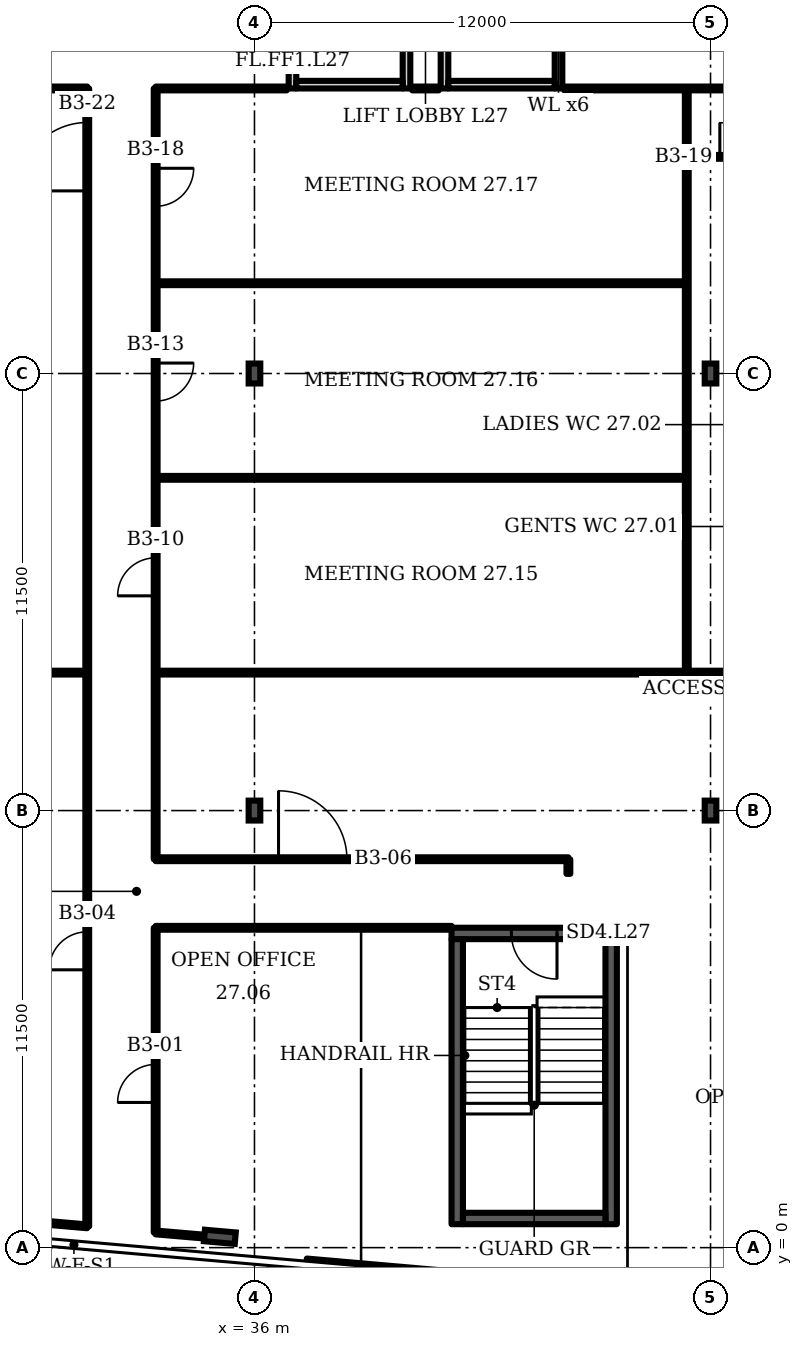
"""IFC4 building model, lengths in metres.
Left out: names, types, materials, properties, quantities, classifications, styles, units other than length and angle.
Written with IfcOpenShell. Run it as: python <this file> out.ifc"""

import sys

from ifc_helpers import new_model, si_unit, direction, frame, frame_2d, origin, origin_2d, place, context, subcontext, project, spatial, rectangle, i_section, extrude, element, fill, save


model = new_model("IFC4")
c1 = context("Model", 3, precision=1e-05, world=origin(), true_north=direction((0.0, 1.0)))
c2 = subcontext(c1, "Body", "Model", "MODEL_VIEW")
j1 = project(units=[si_unit("LENGTHUNIT", "METRE"), si_unit("PLANEANGLEUNIT", "RADIAN")], contexts=[c1])
p1 = place(None, origin())
s1 = spatial("IfcSite", under=j1, at=p1, CompositionType="ELEMENT")
p2 = place(p1, origin())
s2 = spatial("IfcBuilding", under=s1, at=p2, CompositionType="ELEMENT")
p3 = place(p2, frame((0.0, 0.0, 118.3)))
s3 = spatial("IfcBuildingStorey", under=s2, at=p3, CompositionType="ELEMENT", Elevation=118.3)
p4 = place(p3, frame((35.089, 0.285, 0.0), z_axis=(0.0, 0.0, 1.0), x_axis=(-0.087156, -0.996198, 0.0)))
e1 = element("IfcColumn", 1, at=p4, inside=s3, PredefinedType="COLUMN", context=c2, shape_type="SweptSolid", body=[
    extrude(i_section(OverallWidth=0.303, OverallDepth=0.814, WebThickness=0.021, FlangeThickness=0.04, FilletRadius=0.03, at=origin_2d()), origin(), (0.0, 0.0, 1.0), 3.6),
])
for number, where, z_axis, x_axis in (
    (2, (36.0, 11.5, 0.0), (0.0, 0.0, 1.0), (1.0, 0.0, 0.0)),
    (3, (48.0, 11.5, 0.0), (0.0, 0.0, 1.0), (1.0, 0.0, 0.0)),
    (4, (36.0, 23.0, 0.0), (0.0, 0.0, 1.0), (1.0, 0.0, 0.0)),
    (5, (48.0, 23.0, 0.0), (0.0, 0.0, 1.0), (1.0, 0.0, 0.0)),
):
    element("IfcColumn", number, at=place(p3, frame(where, z_axis=z_axis, x_axis=x_axis)), inside=s3, PredefinedType="COLUMN", context=c2, shape_type="SweptSolid", body=[
        extrude(i_section(OverallWidth=0.306, OverallDepth=0.524, WebThickness=0.021, FlangeThickness=0.04, FilletRadius=0.027, at=origin_2d()), origin(), (0.0, 0.0, 1.0), 3.6),
    ])
p5 = place(p3, frame((37.363, -0.461, 0.0), z_axis=(0.0, 0.0, 1.0), x_axis=(0.996194, -0.087159, 0.0)))
e6 = element("IfcWall", 6, at=p5, inside=s3, PredefinedType="SOLIDWALL", context=c2, shape_type="SweptSolid", body=[
    extrude(rectangle(XDim=12.199, YDim=0.35, at=frame_2d((6.099, 0.0))), origin(), (0.0, 0.0, 1.0), 1.0),
])
p6 = place(p3, frame((37.0, 30.5, 0.0), z_axis=(0.0, 0.0, 1.0), x_axis=(0.0, 1.0, 0.0)))
e7 = element("IfcWall", 7, at=p6, inside=s3, PredefinedType="PARTITIONING", context=c2, shape_type="SweptSolid", body=[
    extrude(rectangle(XDim=3.5, YDim=0.2, at=frame_2d((1.75, 0.0))), origin(), (0.0, 0.0, 1.0), 3.2),
])
p7 = place(p6, frame((1.2, 0.0, 0.0)))
e8 = element("IfcOpeningElement", 8, at=p7, cuts=e7, PredefinedType="OPENING", context=c2, shape_type="SweptSolid", body=[
    extrude(rectangle(XDim=1.1, YDim=2.1, at=frame_2d((0.55, 1.05))), frame((0.0, 0.11, 0.0), z_axis=(0.0, -1.0, 0.0), x_axis=(1.0, 0.0, 0.0)), (0.0, 0.0, 1.0), 0.22),
])
p8 = place(p3, frame((40.0, 30.5, 0.0), z_axis=(0.0, 0.0, 1.0), x_axis=(0.0, 1.0, 0.0)))
e9 = element("IfcWall", 9, at=p8, inside=s3, PredefinedType="PARTITIONING", context=c2, shape_type="SweptSolid", body=[
    extrude(rectangle(XDim=3.5, YDim=0.2, at=frame_2d((1.75, 0.0))), origin(), (0.0, 0.0, 1.0), 3.2),
])
p9 = place(p3, frame((37.1, 30.6, 0.0), z_axis=(0.0, 0.0, 1.0), x_axis=(1.0, 0.0, 0.0)))
e10 = element("IfcWall", 10, at=p9, inside=s3, PredefinedType="PARTITIONING", context=c2, shape_type="SweptSolid", body=[
    extrude(rectangle(XDim=2.8, YDim=0.2, at=frame_2d((1.4, 0.0))), origin(), (0.0, 0.0, 1.0), 3.2),
])
p10 = place(p3, frame((41.0, 30.5, 0.0), z_axis=(0.0, 0.0, 1.0), x_axis=(0.0, 1.0, 0.0)))
e11 = element("IfcWall", 11, at=p10, inside=s3, PredefinedType="PARTITIONING", context=c2, shape_type="SweptSolid", body=[
    extrude(rectangle(XDim=3.5, YDim=0.2, at=frame_2d((1.75, 0.0))), origin(), (0.0, 0.0, 1.0), 3.2),
])
p11 = place(p3, frame((44.0, 30.5, 0.0), z_axis=(0.0, 0.0, 1.0), x_axis=(0.0, 1.0, 0.0)))
e12 = element("IfcWall", 12, at=p11, inside=s3, PredefinedType="PARTITIONING", context=c2, shape_type="SweptSolid", body=[
    extrude(rectangle(XDim=3.5, YDim=0.2, at=frame_2d((1.75, 0.0))), origin(), (0.0, 0.0, 1.0), 3.2),
])
p12 = place(p11, frame((1.2, 0.0, 0.0)))
e13 = element("IfcOpeningElement", 13, at=p12, cuts=e12, PredefinedType="OPENING", context=c2, shape_type="SweptSolid", body=[
    extrude(rectangle(XDim=1.1, YDim=2.1, at=frame_2d((0.55, 1.05))), frame((0.0, 0.11, 0.0), z_axis=(0.0, -1.0, 0.0), x_axis=(1.0, 0.0, 0.0)), (0.0, 0.0, 1.0), 0.22),
])
p13 = place(p3, frame((41.1, 30.6, 0.0), z_axis=(0.0, 0.0, 1.0), x_axis=(1.0, 0.0, 0.0)))
e14 = element("IfcWall", 14, at=p13, inside=s3, PredefinedType="PARTITIONING", context=c2, shape_type="SweptSolid", body=[
    extrude(rectangle(XDim=2.8, YDim=0.2, at=frame_2d((1.4, 0.0))), origin(), (0.0, 0.0, 1.0), 3.2),
])
p14 = place(p3, frame((41.185, 8.267, 0.0), z_axis=(0.0, 0.0, 1.0), x_axis=(1.0, 0.0, 0.0)))
e15 = element("IfcWall", 15, at=p14, inside=s3, PredefinedType="SHEAR", context=c2, shape_type="SweptSolid", body=[
    extrude(rectangle(XDim=4.35, YDim=0.3, at=frame_2d((2.175, 0.0))), origin(), (0.0, 0.0, 1.0), 3.2),
])
p15 = place(p14, frame((1.575, 0.0, 0.0)))
e16 = element("IfcOpeningElement", 16, at=p15, cuts=e15, PredefinedType="OPENING", context=c2, shape_type="SweptSolid", body=[
    extrude(rectangle(XDim=1.2, YDim=2.1, at=frame_2d((0.6, 1.05))), frame((0.0, 0.16, 0.0), z_axis=(0.0, -1.0, 0.0), x_axis=(1.0, 0.0, 0.0)), (0.0, 0.0, 1.0), 0.32),
])
p16 = place(p3, frame((13.0, 15.13, 0.0), z_axis=(0.0, 0.0, 1.0), x_axis=(1.0, 0.0, 0.0)))
e17 = element("IfcWall", 17, at=p16, inside=s3, PredefinedType="PARTITIONING", context=c2, shape_type="SweptSolid", body=[
    extrude(rectangle(XDim=18.6, YDim=0.1, at=frame_2d((9.3, 0.0))), origin(), (0.0, 0.0, 1.0), 3.2),
])
p17 = place(p3, frame((17.8, 30.5, 0.0), z_axis=(0.0, 0.0, 1.0), x_axis=(1.0, 0.0, 0.0)))
e18 = element("IfcWall", 18, at=p17, inside=s3, PredefinedType="PARTITIONING", context=c2, shape_type="SweptSolid", body=[
    extrude(rectangle(XDim=13.8, YDim=0.1, at=frame_2d((6.9, 0.0))), origin(), (0.0, 0.0, 1.0), 3.2),
])
p18 = place(p3, frame((31.6, 0.56, 0.0), z_axis=(0.0, 0.0, 1.0), x_axis=(0.0, 1.0, 0.0)))
e19 = element("IfcWall", 19, at=p18, inside=s3, PredefinedType="PARTITIONING", context=c2, shape_type="SweptSolid", body=[
    extrude(rectangle(XDim=29.94, YDim=0.1, at=frame_2d((14.97, 0.0))), origin(), (0.0, 0.0, 1.0), 3.2),
])
p19 = place(p18, frame((6.75, 0.0, 0.0)))
e20 = element("IfcOpeningElement", 20, at=p19, cuts=e19, PredefinedType="OPENING", context=c2, shape_type="SweptSolid", body=[
    extrude(rectangle(XDim=1.0, YDim=2.1, at=frame_2d((0.5, 1.05))), frame((0.0, 0.06, 0.0), z_axis=(0.0, -1.0, 0.0), x_axis=(1.0, 0.0, 0.0)), (0.0, 0.0, 1.0), 0.12),
])
p20 = place(p18, frame((27.245, 0.0, 0.0)))
e21 = element("IfcOpeningElement", 21, at=p20, cuts=e19, PredefinedType="OPENING", context=c2, shape_type="SweptSolid", body=[
    extrude(rectangle(XDim=1.8, YDim=2.1, at=frame_2d((0.9, 1.05))), frame((0.0, 0.06, 0.0), z_axis=(0.0, -1.0, 0.0), x_axis=(1.0, 0.0, 0.0)), (0.0, 0.0, 1.0), 0.12),
])
p21 = place(p3, frame((31.6, 0.56, 0.0), z_axis=(0.0, 0.0, 1.0), x_axis=(-0.996229, 0.086796, 0.0)))
e22 = element("IfcWall", 22, at=p21, inside=s3, PredefinedType="PARTITIONING", context=c2, shape_type="SweptSolid", body=[
    extrude(rectangle(XDim=6.911, YDim=0.1, at=frame_2d((3.456, 0.0))), origin(), (0.0, 0.0, 1.0), 2.58),
])
p22 = place(p3, frame((33.4, 0.4, 0.0), z_axis=(0.0, 0.0, 1.0), x_axis=(0.0, 1.0, 0.0)))
e23 = element("IfcWall", 23, at=p22, inside=s3, PredefinedType="PARTITIONING", context=c2, shape_type="SweptSolid", body=[
    extrude(rectangle(XDim=8.015, YDim=0.1, at=frame_2d((4.008, 0.0))), origin(), (0.0, 0.0, 1.0), 3.2),
])
p23 = place(p22, frame((3.42, 0.0, 0.0)))
e24 = element("IfcOpeningElement", 24, at=p23, cuts=e23, PredefinedType="OPENING", context=c2, shape_type="SweptSolid", body=[
    extrude(rectangle(XDim=1.0, YDim=2.1, at=frame_2d((0.5, 1.05))), frame((0.0, 0.06, 0.0), z_axis=(0.0, -1.0, 0.0), x_axis=(1.0, 0.0, 0.0)), (0.0, 0.0, 1.0), 0.12),
])
p24 = place(p3, frame((33.4, 8.415, 0.0), z_axis=(0.0, 0.0, 1.0), x_axis=(1.0, 0.0, 0.0)))
e25 = element("IfcWall", 25, at=p24, inside=s3, PredefinedType="PARTITIONING", context=c2, shape_type="SweptSolid", body=[
    extrude(rectangle(XDim=7.785, YDim=0.1, at=frame_2d((3.893, 0.0))), origin(), (0.0, 0.0, 1.0), 3.2),
])
p25 = place(p3, frame((33.4, 10.22, 0.0), z_axis=(0.0, 0.0, 1.0), x_axis=(0.0, 1.0, 0.0)))
e26 = element("IfcWall", 26, at=p25, inside=s3, PredefinedType="PARTITIONING", context=c2, shape_type="SweptSolid", body=[
    extrude(rectangle(XDim=20.28, YDim=0.1, at=frame_2d((10.14, 0.0))), origin(), (0.0, 0.0, 1.0), 3.2),
])
p26 = place(p25, frame((6.93, 0.0, 0.0)))
e27 = element("IfcOpeningElement", 27, at=p26, cuts=e26, PredefinedType="OPENING", context=c2, shape_type="SweptSolid", body=[
    extrude(rectangle(XDim=1.0, YDim=2.1, at=frame_2d((0.5, 1.05))), frame((0.0, 0.06, 0.0), z_axis=(0.0, -1.0, 0.0), x_axis=(1.0, 0.0, 0.0)), (0.0, 0.0, 1.0), 0.12),
])
p27 = place(p25, frame((12.055, 0.0, 0.0)))
e28 = element("IfcOpeningElement", 28, at=p27, cuts=e26, PredefinedType="OPENING", context=c2, shape_type="SweptSolid", body=[
    extrude(rectangle(XDim=1.0, YDim=2.1, at=frame_2d((0.5, 1.05))), frame((0.0, 0.06, 0.0), z_axis=(0.0, -1.0, 0.0), x_axis=(1.0, 0.0, 0.0)), (0.0, 0.0, 1.0), 0.12),
])
p28 = place(p25, frame((17.18, 0.0, 0.0)))
e29 = element("IfcOpeningElement", 29, at=p28, cuts=e26, PredefinedType="OPENING", context=c2, shape_type="SweptSolid", body=[
    extrude(rectangle(XDim=1.0, YDim=2.1, at=frame_2d((0.5, 1.05))), frame((0.0, 0.06, 0.0), z_axis=(0.0, -1.0, 0.0), x_axis=(1.0, 0.0, 0.0)), (0.0, 0.0, 1.0), 0.12),
])
p29 = place(p3, frame((33.4, 10.22, 0.0), z_axis=(0.0, 0.0, 1.0), x_axis=(1.0, 0.0, 0.0)))
e30 = element("IfcWall", 30, at=p29, inside=s3, PredefinedType="PARTITIONING", context=c2, shape_type="SweptSolid", body=[
    extrude(rectangle(XDim=10.86, YDim=0.1, at=frame_2d((5.43, 0.0))), origin(), (0.0, 0.0, 1.0), 3.2),
])
p30 = place(p29, frame((3.233, 0.0, 0.0)))
e31 = element("IfcOpeningElement", 31, at=p30, cuts=e30, PredefinedType="OPENING", context=c2, shape_type="SweptSolid", body=[
    extrude(rectangle(XDim=1.8, YDim=2.1, at=frame_2d((0.9, 1.05))), frame((0.0, 0.06, 0.0), z_axis=(0.0, -1.0, 0.0), x_axis=(1.0, 0.0, 0.0)), (0.0, 0.0, 1.0), 0.12),
])
p31 = place(p3, frame((33.4, 15.13, 0.0), z_axis=(0.0, 0.0, 1.0), x_axis=(1.0, 0.0, 0.0)))
e32 = element("IfcWall", 32, at=p31, inside=s3, PredefinedType="PARTITIONING", context=c2, shape_type="SweptSolid", body=[
    extrude(rectangle(XDim=24.2, YDim=0.1, at=frame_2d((12.1, 0.0))), origin(), (0.0, 0.0, 1.0), 3.2),
])
for number, where, z_axis, x_axis in (
    (33, (33.4, 20.255, 0.0), (0.0, 0.0, 1.0), (1.0, 0.0, 0.0)),
    (34, (33.4, 25.375, 0.0), (0.0, 0.0, 1.0), (1.0, 0.0, 0.0)),
):
    element("IfcWall", number, at=place(p3, frame(where, z_axis=z_axis, x_axis=x_axis)), inside=s3, PredefinedType="PARTITIONING", context=c2, shape_type="SweptSolid", body=[
        extrude(rectangle(XDim=13.975, YDim=0.1, at=frame_2d((6.988, 0.0))), origin(), (0.0, 0.0, 1.0), 3.2),
    ])
p32 = place(p3, frame((33.4, 30.5, 0.0), z_axis=(0.0, 0.0, 1.0), x_axis=(1.0, 0.0, 0.0)))
e35 = element("IfcWall", 35, at=p32, inside=s3, PredefinedType="PARTITIONING", context=c2, shape_type="SweptSolid", body=[
    extrude(rectangle(XDim=3.45, YDim=0.1, at=frame_2d((1.725, 0.0))), origin(), (0.0, 0.0, 1.0), 3.2),
])
p33 = place(p3, frame((35.085, 0.255, 0.0), z_axis=(0.0, 0.0, 1.0), x_axis=(-0.996316, 0.085745, 0.0)))
e36 = element("IfcWall", 36, at=p33, inside=s3, PredefinedType="PARTITIONING", context=c2, shape_type="SweptSolid", body=[
    extrude(rectangle(XDim=1.691, YDim=0.1, at=frame_2d((0.846, 0.0))), origin(), (0.0, 0.0, 1.0), 2.58),
])
p34 = place(p3, frame((44.26, 9.835, 0.0), z_axis=(0.0, 0.0, 1.0), x_axis=(0.0, 1.0, 0.0)))
e37 = element("IfcWall", 37, at=p34, inside=s3, PredefinedType="PARTITIONING", context=c2, shape_type="SweptSolid", body=[
    extrude(rectangle(XDim=0.38, YDim=0.1, at=frame_2d((0.19, 0.0))), origin(), (0.0, 0.0, 1.0), 3.2),
])
p35 = place(p3, frame((47.375, 15.13, 0.0), z_axis=(0.0, 0.0, 1.0), x_axis=(0.0, 1.0, 0.0)))
e38 = element("IfcWall", 38, at=p35, inside=s3, PredefinedType="PARTITIONING", context=c2, shape_type="SweptSolid", body=[
    extrude(rectangle(XDim=15.36, YDim=0.1, at=frame_2d((7.68, 0.0))), origin(), (0.0, 0.0, 1.0), 3.2),
])
p36 = place(p3, frame((47.375, 28.7, 0.0), z_axis=(0.0, 0.0, 1.0), x_axis=(1.0, 0.0, 0.0)))
e39 = element("IfcWall", 39, at=p36, inside=s3, PredefinedType="PARTITIONING", context=c2, shape_type="SweptSolid", body=[
    extrude(rectangle(XDim=6.875, YDim=0.1, at=frame_2d((3.438, 0.0))), origin(), (0.0, 0.0, 1.0), 3.2),
])
p37 = place(p36, frame((0.87, 0.0, 0.0)))
e40 = element("IfcOpeningElement", 40, at=p37, cuts=e39, PredefinedType="OPENING", context=c2, shape_type="SweptSolid", body=[
    extrude(rectangle(XDim=0.9, YDim=2.1, at=frame_2d((0.45, 1.05))), frame((0.0, 0.06, 0.0), z_axis=(0.0, -1.0, 0.0), x_axis=(1.0, 0.0, 0.0)), (0.0, 0.0, 1.0), 0.12),
])
p38 = place(p36, frame((3.26, 0.0, 0.0)))
e41 = element("IfcOpeningElement", 41, at=p38, cuts=e39, PredefinedType="OPENING", context=c2, shape_type="SweptSolid", body=[
    extrude(rectangle(XDim=0.9, YDim=2.1, at=frame_2d((0.45, 1.05))), frame((0.0, 0.06, 0.0), z_axis=(0.0, -1.0, 0.0), x_axis=(1.0, 0.0, 0.0)), (0.0, 0.0, 1.0), 0.12),
])
p39 = place(p36, frame((5.395, 0.0, 0.0)))
e42 = element("IfcOpeningElement", 42, at=p39, cuts=e39, PredefinedType="OPENING", context=c2, shape_type="SweptSolid", body=[
    extrude(rectangle(XDim=1.0, YDim=2.1, at=frame_2d((0.5, 1.05))), frame((0.0, 0.06, 0.0), z_axis=(0.0, -1.0, 0.0), x_axis=(1.0, 0.0, 0.0)), (0.0, 0.0, 1.0), 0.12),
])
p40 = place(p3, frame((40.15, 30.5, 0.0), z_axis=(0.0, 0.0, 1.0), x_axis=(1.0, 0.0, 0.0)))
e43 = element("IfcWall", 43, at=p40, inside=s3, PredefinedType="PARTITIONING", context=c2, shape_type="SweptSolid", body=[
    extrude(rectangle(XDim=0.7, YDim=0.1, at=frame_2d((0.35, 0.0))), origin(), (0.0, 0.0, 1.0), 3.2),
])
p41 = place(p3, frame((44.15, 30.5, 0.0), z_axis=(0.0, 0.0, 1.0), x_axis=(1.0, 0.0, 0.0)))
e44 = element("IfcWall", 44, at=p41, inside=s3, PredefinedType="PARTITIONING", context=c2, shape_type="SweptSolid", body=[
    extrude(rectangle(XDim=13.45, YDim=0.1, at=frame_2d((6.725, 0.0))), origin(), (0.0, 0.0, 1.0), 3.2),
])
for number, where, z_axis, x_axis in (
    (45, (41.335, 0.617, 0.0), (0.0, 0.0, 1.0), (0.0, 1.0, 0.0)),
    (46, (45.385, 0.617, 0.0), (0.0, 0.0, 1.0), (0.0, 1.0, 0.0)),
):
    element("IfcWall", number, at=place(p3, frame(where, z_axis=z_axis, x_axis=x_axis)), inside=s3, PredefinedType="SHEAR", context=c2, shape_type="SweptSolid", body=[
        extrude(rectangle(XDim=7.5, YDim=0.3, at=frame_2d((3.75, 0.0))), origin(), (0.0, 0.0, 1.0), 3.2),
    ])
p42 = place(p3, frame((41.485, 0.767, 0.0), z_axis=(0.0, 0.0, 1.0), x_axis=(1.0, 0.0, 0.0)))
e47 = element("IfcWall", 47, at=p42, inside=s3, PredefinedType="SHEAR", context=c2, shape_type="SweptSolid", body=[
    extrude(rectangle(XDim=3.75, YDim=0.3, at=frame_2d((1.875, 0.0))), origin(), (0.0, 0.0, 1.0), 3.2),
])
p43 = place(p15, origin())
e48 = element("IfcDoor", 48, at=p43, inside=s3, OperationType="SINGLE_SWING_RIGHT", PredefinedType="DOOR", context=c2, shape_type="SweptSolid", body=[
    extrude(rectangle(XDim=1.2, YDim=2.1, at=frame_2d((0.6, 1.05))), frame((0.0, 0.025, 0.0), z_axis=(0.0, -1.0, 0.0), x_axis=(1.0, 0.0, 0.0)), (0.0, 0.0, 1.0), 0.05),
])
fill(e16, e48)
p44 = place(p23, origin())
e49 = element("IfcDoor", 49, at=p44, inside=s3, OperationType="SINGLE_SWING_LEFT", PredefinedType="DOOR", context=c2, shape_type="SweptSolid", body=[
    extrude(rectangle(XDim=1.0, YDim=2.1, at=frame_2d((0.5, 1.05))), frame((0.0, 0.025, 0.0), z_axis=(0.0, -1.0, 0.0), x_axis=(1.0, 0.0, 0.0)), (0.0, 0.0, 1.0), 0.05),
])
fill(e24, e49)
p45 = place(p19, origin())
e50 = element("IfcDoor", 50, at=p45, inside=s3, OperationType="SINGLE_SWING_LEFT", PredefinedType="DOOR", context=c2, shape_type="SweptSolid", body=[
    extrude(rectangle(XDim=1.0, YDim=2.1, at=frame_2d((0.5, 1.05))), frame((0.0, 0.025, 0.0), z_axis=(0.0, -1.0, 0.0), x_axis=(1.0, 0.0, 0.0)), (0.0, 0.0, 1.0), 0.05),
])
fill(e20, e50)
p46 = place(p30, origin())
e51 = element("IfcDoor", 51, at=p46, inside=s3, OperationType="DOUBLE_DOOR_SINGLE_SWING", PredefinedType="DOOR", context=c2, shape_type="SweptSolid", body=[
    extrude(rectangle(XDim=1.8, YDim=2.1, at=frame_2d((0.9, 1.05))), frame((0.0, 0.025, 0.0), z_axis=(0.0, -1.0, 0.0), x_axis=(1.0, 0.0, 0.0)), (0.0, 0.0, 1.0), 0.05),
])
fill(e31, e51)
p47 = place(p26, origin())
e52 = element("IfcDoor", 52, at=p47, inside=s3, OperationType="SINGLE_SWING_LEFT", PredefinedType="DOOR", context=c2, shape_type="SweptSolid", body=[
    extrude(rectangle(XDim=1.0, YDim=2.1, at=frame_2d((0.5, 1.05))), frame((0.0, 0.025, 0.0), z_axis=(0.0, -1.0, 0.0), x_axis=(1.0, 0.0, 0.0)), (0.0, 0.0, 1.0), 0.05),
])
fill(e27, e52)
p48 = place(p27, origin())
e53 = element("IfcDoor", 53, at=p48, inside=s3, OperationType="SINGLE_SWING_RIGHT", PredefinedType="DOOR", context=c2, shape_type="SweptSolid", body=[
    extrude(rectangle(XDim=1.0, YDim=2.1, at=frame_2d((0.5, 1.05))), frame((0.0, 0.025, 0.0), z_axis=(0.0, -1.0, 0.0), x_axis=(1.0, 0.0, 0.0)), (0.0, 0.0, 1.0), 0.05),
])
fill(e28, e53)
p49 = place(p28, origin())
e54 = element("IfcDoor", 54, at=p49, inside=s3, OperationType="SINGLE_SWING_RIGHT", PredefinedType="DOOR", context=c2, shape_type="SweptSolid", body=[
    extrude(rectangle(XDim=1.0, YDim=2.1, at=frame_2d((0.5, 1.05))), frame((0.0, 0.025, 0.0), z_axis=(0.0, -1.0, 0.0), x_axis=(1.0, 0.0, 0.0)), (0.0, 0.0, 1.0), 0.05),
])
fill(e29, e54)
p50 = place(p37, origin())
e55 = element("IfcDoor", 55, at=p50, inside=s3, OperationType="SINGLE_SWING_LEFT", PredefinedType="DOOR", context=c2, shape_type="SweptSolid", body=[
    extrude(rectangle(XDim=0.9, YDim=2.1, at=frame_2d((0.45, 1.05))), frame((0.0, 0.025, 0.0), z_axis=(0.0, -1.0, 0.0), x_axis=(1.0, 0.0, 0.0)), (0.0, 0.0, 1.0), 0.05),
])
fill(e40, e55)
p51 = place(p20, origin())
e56 = element("IfcDoor", 56, at=p51, inside=s3, OperationType="DOUBLE_DOOR_SINGLE_SWING", PredefinedType="DOOR", context=c2, shape_type="SweptSolid", body=[
    extrude(rectangle(XDim=1.8, YDim=2.1, at=frame_2d((0.9, 1.05))), frame((0.0, 0.025, 0.0), z_axis=(0.0, -1.0, 0.0), x_axis=(1.0, 0.0, 0.0)), (0.0, 0.0, 1.0), 0.05),
])
fill(e21, e56)
save(model, sys.argv[1])
